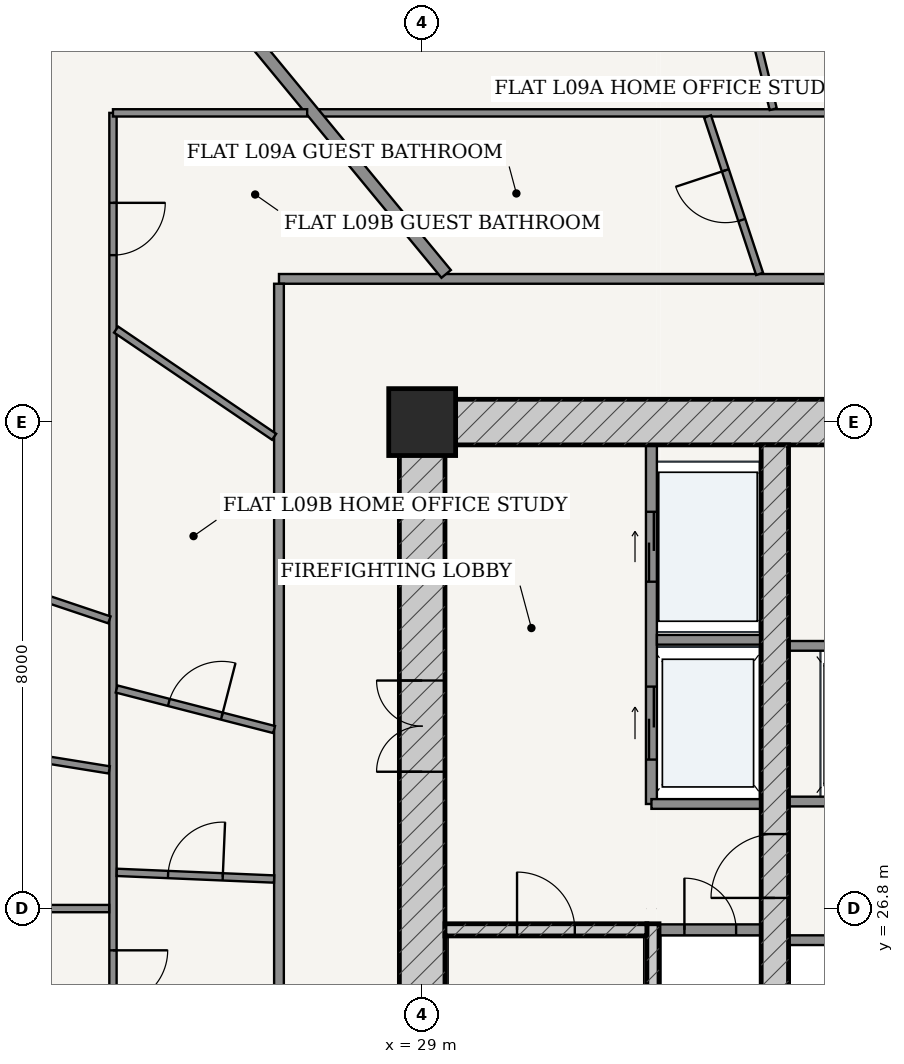
"""IFC4 building model, lengths in metres.
Left out: names, types, materials, properties, quantities, classifications, styles, units other than length and angle.
Written with IfcOpenShell. Run it as: python <this file> out.ifc"""

import sys

from ifc_helpers import new_model, si_unit, direction, frame, frame_2d, origin, origin_2d, place, context, subcontext, project, spatial, rectangle, extrude, source, transform, mapped, element, fill, save


model = new_model("IFC4")
c1 = context("Model", 3, precision=1e-05, world=origin(), true_north=direction((-0.2419218956, 0.970295726276)))
c2 = subcontext(c1, "Body", "Model", "MODEL_VIEW")
j1 = project(units=[si_unit("LENGTHUNIT", "METRE"), si_unit("PLANEANGLEUNIT", "RADIAN")], contexts=[c1])
p1 = place(None, origin())
s1 = spatial("IfcSite", under=j1, at=p1, CompositionType="ELEMENT")
p2 = place(p1, origin())
s2 = spatial("IfcBuilding", under=s1, at=p2, CompositionType="ELEMENT")
p3 = place(p2, frame((0.0, 0.0, 38.4)))
s3 = spatial("IfcBuildingStorey", under=s2, at=p3, CompositionType="ELEMENT", Elevation=38.4)
p4 = place(p3, frame((29.0, 34.8, 0.0), z_axis=(0.0, 0.0, 1.0), x_axis=(1.0, 0.0, 0.0)))
e1 = element("IfcColumn", 1, at=p4, inside=s3, PredefinedType="COLUMN", context=c2, shape_type="SweptSolid", body=[
    extrude(rectangle(XDim=1.1, YDim=1.1, at=origin_2d()), origin(), (0.0, 0.0, 1.0), 3.6),
])
p5 = place(p3, frame((28.625, 34.8, 0.0), z_axis=(0.0, 0.0, 1.0), x_axis=(1.0, 0.0, 0.0)))
e2 = element("IfcWall", 2, at=p5, inside=s3, PredefinedType="SHEAR", context=c2, shape_type="SweptSolid", body=[
    extrude(rectangle(XDim=18.75, YDim=0.75, at=frame_2d((9.375, 0.0))), origin(), (0.0, 0.0, 1.0), 3.32),
])
p6 = place(p5, frame((7.407, 0.0, 0.0)))
e3 = element("IfcOpeningElement", 3, at=p6, cuts=e2, PredefinedType="OPENING", context=c2, shape_type="SweptSolid", body=[
    extrude(rectangle(XDim=0.86, YDim=2.1, at=frame_2d((0.43, 1.05))), frame((0.0, 0.385, 0.0), z_axis=(0.0, -1.0, 0.0), x_axis=(1.0, 0.0, 0.0)), (0.0, 0.0, 1.0), 0.77),
])
p7 = place(p5, frame((10.488, 0.0, 0.0)))
e4 = element("IfcOpeningElement", 4, at=p7, cuts=e2, PredefinedType="OPENING", context=c2, shape_type="SweptSolid", body=[
    extrude(rectangle(XDim=0.85, YDim=2.1, at=frame_2d((0.425, 1.05))), frame((0.0, 0.385, 0.0), z_axis=(0.0, -1.0, 0.0), x_axis=(1.0, 0.0, 0.0)), (0.0, 0.0, 1.0), 0.77),
])
p8 = place(p3, frame((29.0, 19.175, 0.0), z_axis=(0.0, 0.0, 1.0), x_axis=(0.0, 1.0, 0.0)))
e5 = element("IfcWall", 5, at=p8, inside=s3, PredefinedType="SHEAR", context=c2, shape_type="SweptSolid", body=[
    extrude(rectangle(XDim=15.25, YDim=0.75, at=frame_2d((7.625, 0.0))), origin(), (0.0, 0.0, 1.0), 3.32),
])
p9 = place(p8, frame((9.875, 0.0, 0.0)))
e6 = element("IfcOpeningElement", 6, at=p9, cuts=e5, PredefinedType="OPENING", context=c2, shape_type="SweptSolid", body=[
    extrude(rectangle(XDim=1.5, YDim=2.2, at=frame_2d((0.75, 1.1))), frame((0.0, 0.385, 0.0), z_axis=(0.0, -1.0, 0.0), x_axis=(1.0, 0.0, 0.0)), (0.0, 0.0, 1.0), 0.77),
])
p10 = place(p3, frame((32.795, 19.175, 0.0), z_axis=(0.0, 0.0, 1.0), x_axis=(0.0, 1.0, 0.0)))
e7 = element("IfcWall", 7, at=p10, inside=s3, PredefinedType="SOLIDWALL", context=c2, shape_type="SweptSolid", body=[
    extrude(rectangle(XDim=7.375, YDim=0.2, at=frame_2d((3.688, 0.0))), origin(), (0.0, 0.0, 1.0), 3.32),
])
p11 = place(p3, frame((29.375, 26.45, 0.0), z_axis=(0.0, 0.0, 1.0), x_axis=(1.0, 0.0, 0.0)))
e8 = element("IfcWall", 8, at=p11, inside=s3, PredefinedType="SOLIDWALL", context=c2, shape_type="SweptSolid", body=[
    extrude(rectangle(XDim=3.32, YDim=0.2, at=frame_2d((1.66, 0.0))), origin(), (0.0, 0.0, 1.0), 3.32),
])
p12 = place(p11, frame((1.185, 0.0, 0.0)))
e9 = element("IfcOpeningElement", 9, at=p12, cuts=e8, PredefinedType="OPENING", context=c2, shape_type="SweptSolid", body=[
    extrude(rectangle(XDim=0.95, YDim=2.15, at=frame_2d((0.475, 1.075))), frame((0.0, 0.11, 0.0), z_axis=(0.0, -1.0, 0.0), x_axis=(1.0, 0.0, 0.0)), (0.0, 0.0, 1.0), 0.22),
])
p13 = place(p3, frame((34.8, 19.175, 0.0), z_axis=(0.0, 0.0, 1.0), x_axis=(0.0, 1.0, 0.0)))
e10 = element("IfcWall", 10, at=p13, inside=s3, PredefinedType="SHEAR", context=c2, shape_type="SweptSolid", body=[
    extrude(rectangle(XDim=15.25, YDim=0.45, at=frame_2d((7.625, 0.0))), origin(), (0.0, 0.0, 1.0), 3.32),
])
p14 = place(p13, frame((7.8, 0.0, 0.0)))
e11 = element("IfcOpeningElement", 11, at=p14, cuts=e10, PredefinedType="OPENING", context=c2, shape_type="SweptSolid", body=[
    extrude(rectangle(XDim=1.05, YDim=2.15, at=frame_2d((0.525, 1.075))), frame((0.0, 0.235, 0.0), z_axis=(0.0, -1.0, 0.0), x_axis=(1.0, 0.0, 0.0)), (0.0, 0.0, 1.0), 0.47),
])
p15 = place(p3, frame((32.9, 26.45, 0.0), z_axis=(0.0, 0.0, 1.0), x_axis=(1.0, 0.0, 0.0)))
e12 = element("IfcWall", 12, at=p15, inside=s3, PredefinedType="PARTITIONING", context=c2, shape_type="SweptSolid", body=[
    extrude(rectangle(XDim=1.675, YDim=0.18, at=frame_2d((0.837, 0.0))), origin(), (0.0, 0.0, 1.0), 3.32),
])
p16 = place(p15, frame((0.413, 0.0, 0.0)))
e13 = element("IfcOpeningElement", 13, at=p16, cuts=e12, PredefinedType="OPENING", context=c2, shape_type="SweptSolid", body=[
    extrude(rectangle(XDim=0.85, YDim=2.1, at=frame_2d((0.425, 1.05))), frame((0.0, 0.1, 0.0), z_axis=(0.0, -1.0, 0.0), x_axis=(1.0, 0.0, 0.0)), (0.0, 0.0, 1.0), 0.2),
])
p17 = place(p3, frame((32.77, 28.52, 0.0), z_axis=(0.0, 0.0, 1.0), x_axis=(0.0, 1.0, 0.0)))
e14 = element("IfcWall", 14, at=p17, inside=s3, PredefinedType="PARTITIONING", context=c2, shape_type="SweptSolid", body=[
    extrude(rectangle(XDim=5.905, YDim=0.18, at=frame_2d((2.953, 0.0))), origin(), (0.0, 0.0, 1.0), 3.32),
])
p18 = place(p17, frame((3.655, 0.0, 0.0)))
e15 = element("IfcOpeningElement", 15, at=p18, cuts=e14, PredefinedType="OPENING", context=c2, shape_type="SweptSolid", body=[
    extrude(rectangle(XDim=1.15, YDim=2.2, at=frame_2d((0.575, 1.1))), frame((0.0, 0.1, 0.0), z_axis=(0.0, -1.0, 0.0), x_axis=(1.0, 0.0, 0.0)), (0.0, 0.0, 1.0), 0.2),
])
p19 = place(p17, frame((0.73, 0.0, 0.0)))
e16 = element("IfcOpeningElement", 16, at=p19, cuts=e14, PredefinedType="OPENING", context=c2, shape_type="SweptSolid", body=[
    extrude(rectangle(XDim=1.2, YDim=2.25, at=frame_2d((0.6, 1.125))), frame((0.0, 0.1, 0.0), z_axis=(0.0, -1.0, 0.0), x_axis=(1.0, 0.0, 0.0)), (0.0, 0.0, 1.0), 0.2),
])
p20 = place(p3, frame((32.86, 31.22, 0.0), z_axis=(0.0, 0.0, 1.0), x_axis=(1.0, 0.0, 0.0)))
e17 = element("IfcWall", 17, at=p20, inside=s3, PredefinedType="PARTITIONING", context=c2, shape_type="SweptSolid", body=[
    extrude(rectangle(XDim=1.715, YDim=0.16, at=frame_2d((0.857, 0.0))), origin(), (0.0, 0.0, 1.0), 3.32),
])
p21 = place(p3, frame((32.77, 28.52, 0.0), z_axis=(0.0, 0.0, 1.0), x_axis=(1.0, 0.0, 0.0)))
e18 = element("IfcWall", 18, at=p21, inside=s3, PredefinedType="PARTITIONING", context=c2, shape_type="SweptSolid", body=[
    extrude(rectangle(XDim=1.805, YDim=0.16, at=frame_2d((0.902, 0.0))), origin(), (0.0, 0.0, 1.0), 3.32),
])
p22 = place(p3, frame((35.025, 28.56, 0.0), z_axis=(0.0, 0.0, 1.0), x_axis=(1.0, 0.0, 0.0)))
e19 = element("IfcWall", 19, at=p22, inside=s3, PredefinedType="PARTITIONING", context=c2, shape_type="SweptSolid", body=[
    extrude(rectangle(XDim=5.95, YDim=0.16, at=frame_2d((2.975, 0.0))), origin(), (0.0, 0.0, 1.0), 3.32),
])
p23 = place(p22, frame((0.76, 0.0, 0.0)))
e20 = element("IfcOpeningElement", 20, at=p23, cuts=e19, PredefinedType="OPENING", context=c2, shape_type="SweptSolid", body=[
    extrude(rectangle(XDim=1.1, YDim=2.2, at=frame_2d((0.55, 1.1))), frame((0.0, 0.09, 0.0), z_axis=(0.0, -1.0, 0.0), x_axis=(1.0, 0.0, 0.0)), (0.0, 0.0, 1.0), 0.18),
])
p24 = place(p22, frame((2.425, 0.0, 0.0)))
e21 = element("IfcOpeningElement", 21, at=p24, cuts=e19, PredefinedType="OPENING", context=c2, shape_type="SweptSolid", body=[
    extrude(rectangle(XDim=1.1, YDim=2.2, at=frame_2d((0.55, 1.1))), frame((0.0, 0.09, 0.0), z_axis=(0.0, -1.0, 0.0), x_axis=(1.0, 0.0, 0.0)), (0.0, 0.0, 1.0), 0.18),
])
p25 = place(p22, frame((4.09, 0.0, 0.0)))
e22 = element("IfcOpeningElement", 22, at=p25, cuts=e19, PredefinedType="OPENING", context=c2, shape_type="SweptSolid", body=[
    extrude(rectangle(XDim=1.1, YDim=2.2, at=frame_2d((0.55, 1.1))), frame((0.0, 0.09, 0.0), z_axis=(0.0, -1.0, 0.0), x_axis=(1.0, 0.0, 0.0)), (0.0, 0.0, 1.0), 0.18),
])
for number, where, z_axis, x_axis in (
    (23, (35.025, 31.12, 0.0), (0.0, 0.0, 1.0), (1.0, 0.0, 0.0)),
    (24, (35.025, 26.28, 0.0), (0.0, 0.0, 1.0), (1.0, 0.0, 0.0)),
):
    element("IfcWall", number, at=place(p3, frame(where, z_axis=z_axis, x_axis=x_axis)), inside=s3, PredefinedType="PARTITIONING", context=c2, shape_type="SweptSolid", body=[
        extrude(rectangle(XDim=5.95, YDim=0.16, at=frame_2d((2.975, 0.0))), origin(), (0.0, 0.0, 1.0), 3.32),
    ])
p26 = place(p3, frame((26.645, 37.155, 0.0), z_axis=(0.0, 0.0, 1.0), x_axis=(1.0, 0.0, 0.0)))
e25 = element("IfcWall", 25, at=p26, inside=s3, PredefinedType="PARTITIONING", context=c2, shape_type="SweptSolid", body=[
    extrude(rectangle(XDim=22.71, YDim=0.16, at=frame_2d((11.355, 0.0))), origin(), (0.0, 0.0, 1.0), 2.688),
])
p27 = place(p3, frame((26.645, 16.525, 0.0), z_axis=(0.0, 0.0, 1.0), x_axis=(0.0, 1.0, 0.0)))
e26 = element("IfcWall", 26, at=p27, inside=s3, PredefinedType="PARTITIONING", context=c2, shape_type="SweptSolid", body=[
    extrude(rectangle(XDim=20.55, YDim=0.16, at=frame_2d((10.275, 0.0))), origin(), (0.0, 0.0, 1.0), 2.688),
])
p28 = place(p27, frame((1.226, 0.0, 0.0)))
e27 = element("IfcOpeningElement", 27, at=p28, cuts=e26, PredefinedType="OPENING", context=c2, shape_type="SweptSolid", body=[
    extrude(rectangle(XDim=0.98, YDim=2.2, at=frame_2d((0.49, 1.1))), frame((0.0, 0.09, 0.0), z_axis=(0.0, -1.0, 0.0), x_axis=(1.0, 0.0, 0.0)), (0.0, 0.0, 1.0), 0.18),
])
p29 = place(p3, frame((27.312, 39.885, 0.0), z_axis=(0.0, 0.0, 1.0), x_axis=(1.0, 0.0, 0.0)))
e28 = element("IfcWall", 28, at=p29, inside=s3, PredefinedType="PARTITIONING", context=c2, shape_type="SweptSolid", body=[
    extrude(rectangle(XDim=24.772, YDim=0.12, at=frame_2d((12.386, 0.0))), origin(), (0.0, 0.0, 1.0), 2.688),
])
p30 = place(p3, frame((34.773, 39.945, 0.0), z_axis=(0.0, 0.0, 1.0), x_axis=(-0.238375747469, 0.97117300365, 0.0)))
e29 = element("IfcWall", 29, at=p30, inside=s3, PredefinedType="PARTITIONING", context=c2, shape_type="SweptSolid", body=[
    extrude(rectangle(XDim=10.086, YDim=0.12, at=frame_2d((5.043, 0.0))), origin(), (0.0, 0.0, 1.0), 2.688),
])
p31 = place(p30, frame((3.518, 0.0, 0.0)))
e30 = element("IfcOpeningElement", 30, at=p31, cuts=e29, PredefinedType="OPENING", context=c2, shape_type="SweptSolid", body=[
    extrude(rectangle(XDim=0.9, YDim=2.15, at=frame_2d((0.45, 1.075))), frame((0.0, 0.07, 0.0), z_axis=(0.0, -1.0, 0.0), x_axis=(1.0, 0.0, 0.0)), (0.0, 0.0, 1.0), 0.14),
])
p32 = place(p3, frame((34.549, 37.237, 0.0), z_axis=(0.0, 0.0, 1.0), x_axis=(-0.313863409377, 0.949468145992, 0.0)))
e31 = element("IfcWall", 31, at=p32, inside=s3, PredefinedType="PARTITIONING", context=c2, shape_type="SweptSolid", body=[
    extrude(rectangle(XDim=2.727, YDim=0.12, at=frame_2d((1.364, 0.0))), origin(), (0.0, 0.0, 1.0), 3.32),
])
p33 = place(p32, frame((0.934, 0.0, 0.0)))
e32 = element("IfcOpeningElement", 32, at=p33, cuts=e31, PredefinedType="OPENING", context=c2, shape_type="SweptSolid", body=[
    extrude(rectangle(XDim=0.86, YDim=2.15, at=frame_2d((0.43, 1.075))), frame((0.0, 0.07, 0.0), z_axis=(0.0, -1.0, 0.0), x_axis=(1.0, 0.0, 0.0)), (0.0, 0.0, 1.0), 0.14),
])
p34 = place(p3, frame((29.395, 37.237, 0.0), z_axis=(0.0, 0.0, 1.0), x_axis=(-0.636195770442, 0.77152766747, 0.0)))
e33 = element("IfcWall", 33, at=p34, inside=s3, PredefinedType="PARTITIONING", context=c2, shape_type="SweptSolid", body=[
    extrude(rectangle(XDim=11.681, YDim=0.2, at=frame_2d((5.84, 0.0))), origin(), (0.0, 0.0, 1.0), 2.688),
])
p35 = place(p3, frame((23.915, 13.715, 0.0), z_axis=(0.0, 0.0, 1.0), x_axis=(0.0, 1.0, 0.0)))
e34 = element("IfcWall", 34, at=p35, inside=s3, PredefinedType="PARTITIONING", context=c2, shape_type="SweptSolid", body=[
    extrude(rectangle(XDim=26.17, YDim=0.12, at=frame_2d((13.085, 0.0))), origin(), (0.0, 0.0, 1.0), 2.688),
])
p36 = place(p35, frame((1.895, 0.0, 0.0)))
e35 = element("IfcOpeningElement", 35, at=p36, cuts=e34, PredefinedType="OPENING", context=c2, shape_type="SweptSolid", body=[
    extrude(rectangle(XDim=0.9, YDim=2.15, at=frame_2d((0.45, 1.075))), frame((0.0, 0.07, 0.0), z_axis=(0.0, -1.0, 0.0), x_axis=(1.0, 0.0, 0.0)), (0.0, 0.0, 1.0), 0.14),
])
p37 = place(p35, frame((11.498, 0.0, 0.0)))
e36 = element("IfcOpeningElement", 36, at=p37, cuts=e34, PredefinedType="OPENING", context=c2, shape_type="SweptSolid", body=[
    extrude(rectangle(XDim=0.9, YDim=2.15, at=frame_2d((0.45, 1.075))), frame((0.0, 0.07, 0.0), z_axis=(0.0, -1.0, 0.0), x_axis=(1.0, 0.0, 0.0)), (0.0, 0.0, 1.0), 0.14),
])
p38 = place(p35, frame((23.831, 0.0, 0.0)))
e37 = element("IfcOpeningElement", 37, at=p38, cuts=e34, PredefinedType="OPENING", context=c2, shape_type="SweptSolid", body=[
    extrude(rectangle(XDim=0.86, YDim=2.15, at=frame_2d((0.43, 1.075))), frame((0.0, 0.07, 0.0), z_axis=(0.0, -1.0, 0.0), x_axis=(1.0, 0.0, 0.0)), (0.0, 0.0, 1.0), 0.14),
])
p39 = place(p3, frame((23.915, 39.885, 0.0), z_axis=(0.0, 0.0, 1.0), x_axis=(1.0, 0.0, 0.0)))
e38 = element("IfcWall", 38, at=p39, inside=s3, PredefinedType="PARTITIONING", context=c2, shape_type="SweptSolid", body=[
    extrude(rectangle(XDim=3.194, YDim=0.12, at=frame_2d((1.597, 0.0))), origin(), (0.0, 0.0, 1.0), 2.688),
])
p40 = place(p3, frame((23.856, 31.547, 0.0), z_axis=(0.0, 0.0, 1.0), x_axis=(-0.948017487737, 0.318218231634, 0.0)))
e39 = element("IfcWall", 39, at=p40, inside=s3, PredefinedType="PARTITIONING", context=c2, shape_type="SweptSolid", body=[
    extrude(rectangle(XDim=13.279, YDim=0.12, at=frame_2d((6.639, 0.0))), origin(), (0.0, 0.0, 1.0), 2.762),
])
p41 = place(p40, frame((6.189, 0.0, 0.0)))
e40 = element("IfcOpeningElement", 40, at=p41, cuts=e39, PredefinedType="OPENING", context=c2, shape_type="SweptSolid", body=[
    extrude(rectangle(XDim=0.9, YDim=2.15, at=frame_2d((0.45, 1.075))), frame((0.0, 0.07, 0.0), z_axis=(0.0, -1.0, 0.0), x_axis=(1.0, 0.0, 0.0)), (0.0, 0.0, 1.0), 0.14),
])
p42 = place(p3, frame((23.854, 29.08, 0.0), z_axis=(0.0, 0.0, 1.0), x_axis=(-0.987255773689, 0.159141563768, 0.0)))
e41 = element("IfcWall", 41, at=p42, inside=s3, PredefinedType="PARTITIONING", context=c2, shape_type="SweptSolid", body=[
    extrude(rectangle(XDim=14.359, YDim=0.12, at=frame_2d((7.18, 0.0))), origin(), (0.0, 0.0, 1.0), 2.688),
])
p43 = place(p42, frame((5.66, 0.0, 0.0)))
e42 = element("IfcOpeningElement", 42, at=p43, cuts=e41, PredefinedType="OPENING", context=c2, shape_type="SweptSolid", body=[
    extrude(rectangle(XDim=0.9, YDim=2.15, at=frame_2d((0.45, 1.075))), frame((0.0, 0.07, 0.0), z_axis=(0.0, -1.0, 0.0), x_axis=(1.0, 0.0, 0.0)), (0.0, 0.0, 1.0), 0.14),
])
p44 = place(p3, frame((23.853, 26.8, 0.0), z_axis=(0.0, 0.0, 1.0), x_axis=(-1.0, 0.0, 0.0)))
e43 = element("IfcWall", 43, at=p44, inside=s3, PredefinedType="PARTITIONING", context=c2, shape_type="SweptSolid", body=[
    extrude(rectangle(XDim=14.793, YDim=0.12, at=frame_2d((7.396, 0.0))), origin(), (0.0, 0.0, 1.0), 2.762),
])
p45 = place(p44, frame((6.947, 0.0, 0.0)))
e44 = element("IfcOpeningElement", 44, at=p45, cuts=e43, PredefinedType="OPENING", context=c2, shape_type="SweptSolid", body=[
    extrude(rectangle(XDim=0.9, YDim=2.15, at=frame_2d((0.45, 1.075))), frame((0.0, 0.07, 0.0), z_axis=(0.0, -1.0, 0.0), x_axis=(1.0, 0.0, 0.0)), (0.0, 0.0, 1.0), 0.14),
])
p46 = place(p3, frame((26.565, 34.558, 0.0), z_axis=(0.0, 0.0, 1.0), x_axis=(-0.827501574847, 0.561463394734, 0.0)))
e45 = element("IfcWall", 45, at=p46, inside=s3, PredefinedType="PARTITIONING", context=c2, shape_type="SweptSolid", body=[
    extrude(rectangle(XDim=3.14, YDim=0.12, at=frame_2d((1.57, 0.0))), origin(), (0.0, 0.0, 1.0), 3.32),
])
p47 = place(p3, frame((26.565, 29.744, 0.0), z_axis=(0.0, 0.0, 1.0), x_axis=(-0.968421803088, 0.249317490972, 0.0)))
e46 = element("IfcWall", 46, at=p47, inside=s3, PredefinedType="PARTITIONING", context=c2, shape_type="SweptSolid", body=[
    extrude(rectangle(XDim=2.674, YDim=0.12, at=frame_2d((1.337, 0.0))), origin(), (0.0, 0.0, 1.0), 3.32),
])
p48 = place(p47, frame((0.887, 0.0, 0.0)))
e47 = element("IfcOpeningElement", 47, at=p48, cuts=e46, PredefinedType="OPENING", context=c2, shape_type="SweptSolid", body=[
    extrude(rectangle(XDim=0.9, YDim=2.15, at=frame_2d((0.45, 1.075))), frame((0.0, 0.07, 0.0), z_axis=(0.0, -1.0, 0.0), x_axis=(1.0, 0.0, 0.0)), (0.0, 0.0, 1.0), 0.14),
])
p49 = place(p3, frame((26.565, 27.286, 0.0), z_axis=(0.0, 0.0, 1.0), x_axis=(-0.999100094808, 0.042414626666, 0.0)))
e48 = element("IfcWall", 48, at=p49, inside=s3, PredefinedType="PARTITIONING", context=c2, shape_type="SweptSolid", body=[
    extrude(rectangle(XDim=2.59, YDim=0.12, at=frame_2d((1.295, 0.0))), origin(), (0.0, 0.0, 1.0), 3.32),
])
p50 = place(p49, frame((0.845, 0.0, 0.0)))
e49 = element("IfcOpeningElement", 49, at=p50, cuts=e48, PredefinedType="OPENING", context=c2, shape_type="SweptSolid", body=[
    extrude(rectangle(XDim=0.9, YDim=2.15, at=frame_2d((0.45, 1.075))), frame((0.0, 0.07, 0.0), z_axis=(0.0, -1.0, 0.0), x_axis=(1.0, 0.0, 0.0)), (0.0, 0.0, 1.0), 0.14),
])
m1 = source(origin(), c2, "Body", "SweptSolid", [
    extrude(rectangle(XDim=1.5, YDim=2.2, at=frame_2d((0.75, 1.1))), frame((0.0, 0.025, 0.0), z_axis=(0.0, -1.0, 0.0), x_axis=(1.0, 0.0, 0.0)), (0.0, 0.0, 1.0), 0.05),
])
p51 = place(p9, origin())
e50 = element("IfcDoor", 50, at=p51, inside=s3, OperationType="DOUBLE_DOOR_SINGLE_SWING", PredefinedType="DOOR", context=c2, shape_type="MappedRepresentation", body=[
    mapped(m1, transform((0.0, 0.0, 0.0), scale=1.0)),
])
fill(e6, e50)
m2 = source(origin(), c2, "Body", "SweptSolid", [
    extrude(rectangle(XDim=1.05, YDim=2.15, at=frame_2d((0.525, 1.075))), frame((0.0, 0.025, 0.0), z_axis=(0.0, -1.0, 0.0), x_axis=(1.0, 0.0, 0.0)), (0.0, 0.0, 1.0), 0.05),
])
p52 = place(p14, origin())
e51 = element("IfcDoor", 51, at=p52, inside=s3, OperationType="SINGLE_SWING_LEFT", PredefinedType="DOOR", context=c2, shape_type="MappedRepresentation", body=[
    mapped(m2, transform((0.0, 0.0, 0.0), scale=1.0)),
])
fill(e11, e51)
m3 = source(origin(), c2, "Body", "SweptSolid", [
    extrude(rectangle(XDim=0.95, YDim=2.15, at=frame_2d((0.475, 1.075))), frame((0.0, 0.025, 0.0), z_axis=(0.0, -1.0, 0.0), x_axis=(1.0, 0.0, 0.0)), (0.0, 0.0, 1.0), 0.05),
])
p53 = place(p12, origin())
e52 = element("IfcDoor", 52, at=p53, inside=s3, OperationType="SINGLE_SWING_LEFT", PredefinedType="DOOR", context=c2, shape_type="MappedRepresentation", body=[
    mapped(m3, transform((0.0, 0.0, 0.0), scale=1.0)),
])
fill(e9, e52)
m4 = source(origin(), c2, "Body", "SweptSolid", [
    extrude(rectangle(XDim=0.85, YDim=2.1, at=frame_2d((0.425, 1.05))), frame((0.0, 0.025, 0.0), z_axis=(0.0, -1.0, 0.0), x_axis=(1.0, 0.0, 0.0)), (0.0, 0.0, 1.0), 0.05),
])
p54 = place(p16, origin())
e53 = element("IfcDoor", 53, at=p54, inside=s3, OperationType="SINGLE_SWING_LEFT", PredefinedType="DOOR", context=c2, shape_type="MappedRepresentation", body=[
    mapped(m4, transform((0.0, 0.0, 0.0), scale=1.0)),
])
fill(e13, e53)
m5 = source(origin(), c2, "Body", "SweptSolid", [
    extrude(rectangle(XDim=1.15, YDim=2.2, at=frame_2d((0.575, 1.1))), frame((0.0, 0.025, 0.0), z_axis=(0.0, -1.0, 0.0), x_axis=(1.0, 0.0, 0.0)), (0.0, 0.0, 1.0), 0.05),
])
p55 = place(p18, origin())
e54 = element("IfcDoor", 54, at=p55, inside=s3, OperationType="DOUBLE_DOOR_SLIDING", PredefinedType="DOOR", context=c2, shape_type="MappedRepresentation", body=[
    mapped(m5, transform((0.0, 0.0, 0.0), scale=1.0)),
])
fill(e15, e54)
m6 = source(origin(), c2, "Body", "SweptSolid", [
    extrude(rectangle(XDim=1.2, YDim=2.25, at=frame_2d((0.6, 1.125))), frame((0.0, 0.025, 0.0), z_axis=(0.0, -1.0, 0.0), x_axis=(1.0, 0.0, 0.0)), (0.0, 0.0, 1.0), 0.05),
])
p56 = place(p19, origin())
e55 = element("IfcDoor", 55, at=p56, inside=s3, OperationType="DOUBLE_DOOR_SLIDING", PredefinedType="DOOR", context=c2, shape_type="MappedRepresentation", body=[
    mapped(m6, transform((0.0, 0.0, 0.0), scale=1.0)),
])
fill(e16, e55)
m7 = source(origin(), c2, "Body", "SweptSolid", [
    extrude(rectangle(XDim=0.86, YDim=2.15, at=frame_2d((0.43, 1.075))), frame((0.0, 0.025, 0.0), z_axis=(0.0, -1.0, 0.0), x_axis=(1.0, 0.0, 0.0)), (0.0, 0.0, 1.0), 0.05),
])
p57 = place(p33, origin())
e56 = element("IfcDoor", 56, at=p57, inside=s3, OperationType="SINGLE_SWING_RIGHT", PredefinedType="DOOR", context=c2, shape_type="MappedRepresentation", body=[
    mapped(m7, transform((0.0, 0.0, 0.0), scale=1.0)),
])
fill(e32, e56)
m8 = source(origin(), c2, "Body", "SweptSolid", [
    extrude(rectangle(XDim=0.9, YDim=2.15, at=frame_2d((0.45, 1.075))), frame((0.0, 0.025, 0.0), z_axis=(0.0, -1.0, 0.0), x_axis=(1.0, 0.0, 0.0)), (0.0, 0.0, 1.0), 0.05),
])
p58 = place(p37, frame((0.9, 0.0, 0.0), z_axis=(0.0, 0.0, 1.0), x_axis=(-1.0, 0.0, 0.0)))
e57 = element("IfcDoor", 57, at=p58, inside=s3, OperationType="SINGLE_SWING_LEFT", PredefinedType="DOOR", context=c2, shape_type="MappedRepresentation", body=[
    mapped(m8, transform((0.0, 0.0, 0.0), scale=1.0)),
])
fill(e36, e57)
p59 = place(p50, frame((0.9, 0.0, 0.0), z_axis=(0.0, 0.0, 1.0), x_axis=(-1.0, 0.0, 0.0)))
e58 = element("IfcDoor", 58, at=p59, inside=s3, OperationType="SINGLE_SWING_RIGHT", PredefinedType="DOOR", context=c2, shape_type="MappedRepresentation", body=[
    mapped(m8, transform((0.0, 0.0, 0.0), scale=1.0)),
])
fill(e49, e58)
p60 = place(p48, frame((0.9, 0.0, 0.0), z_axis=(0.0, 0.0, 1.0), x_axis=(-1.0, 0.0, 0.0)))
e59 = element("IfcDoor", 59, at=p60, inside=s3, OperationType="SINGLE_SWING_RIGHT", PredefinedType="DOOR", context=c2, shape_type="MappedRepresentation", body=[
    mapped(m8, transform((0.0, 0.0, 0.0), scale=1.0)),
])
fill(e47, e59)
p61 = place(p38, frame((0.86, 0.0, 0.0), z_axis=(0.0, 0.0, 1.0), x_axis=(-1.0, 0.0, 0.0)))
e60 = element("IfcDoor", 60, at=p61, inside=s3, OperationType="SINGLE_SWING_LEFT", PredefinedType="DOOR", context=c2, shape_type="MappedRepresentation", body=[
    mapped(m7, transform((0.0, 0.0, 0.0), scale=1.0)),
])
fill(e37, e60)
save(model, sys.argv[1])
